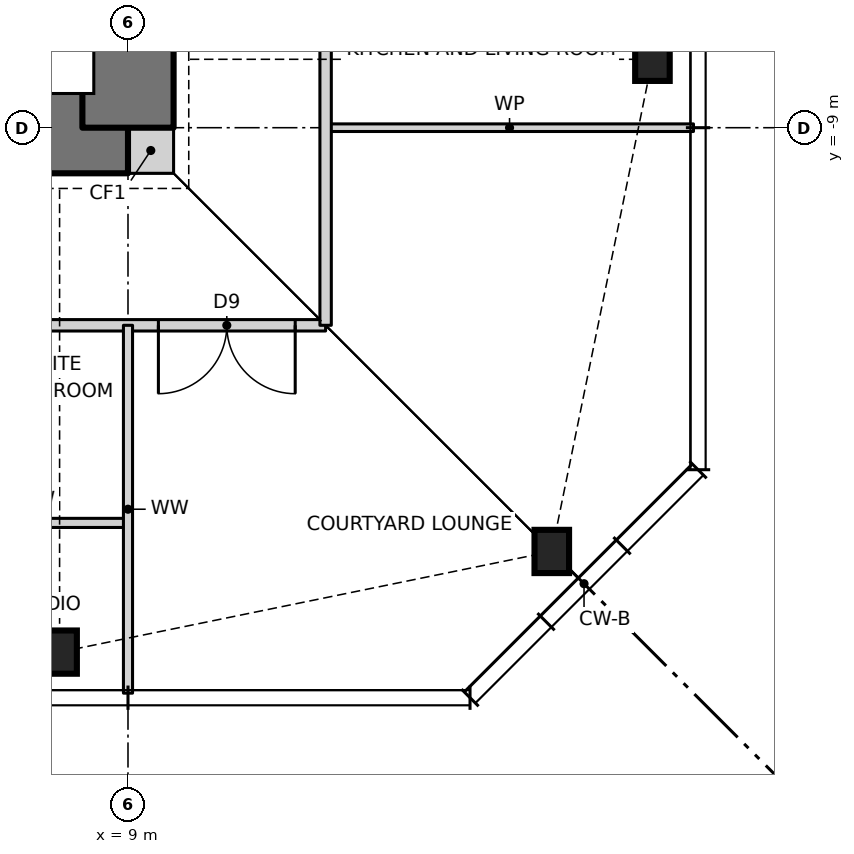
"""IFC4 building model, lengths in metres.
Left out: names, types, materials, properties, quantities, classifications, styles, units other than length and angle.
Written with IfcOpenShell. Run it as: python <this file> out.ifc"""

import sys

from ifc_helpers import new_model, si_unit, direction, frame, frame_2d, origin, origin_2d, place, context, subcontext, project, spatial, rectangle, i_section, extrude, element, fill, save


model = new_model("IFC4")
c1 = context("Model", 3, precision=1e-05, world=origin(), true_north=direction((0.0, 1.0)))
c2 = subcontext(c1, "Body", "Model", "MODEL_VIEW")
j1 = project(units=[si_unit("LENGTHUNIT", "METRE"), si_unit("PLANEANGLEUNIT", "RADIAN")], contexts=[c1])
p1 = place(None, origin())
s1 = spatial("IfcSite", under=j1, at=p1, CompositionType="ELEMENT")
p2 = place(p1, origin())
s2 = spatial("IfcBuilding", under=s1, at=p2, CompositionType="ELEMENT")
p3 = place(p2, frame((0.0, 0.0, 218.5)))
s3 = spatial("IfcBuildingStorey", under=s2, at=p3, CompositionType="ELEMENT", Elevation=218.5)
for number, where, z_axis, x_axis in (
    (1, (8.1, -15.9, 0.0), (0.0, 0.0, 1.0), (1.0, 0.0, 0.0)),
    (2, (14.576, -14.576, 0.0), (0.0, 0.0, 1.0), (1.0, 0.0, 0.0)),
    (3, (15.9, -8.1, 0.0), (0.0, 0.0, 1.0), (1.0, 0.0, 0.0)),
):
    element("IfcColumn", number, at=place(p3, frame(where, z_axis=z_axis, x_axis=x_axis)), inside=s3, PredefinedType="COLUMN", context=c2, shape_type="SweptSolid", body=[
        extrude(i_section(OverallWidth=0.455, OverallDepth=0.569, WebThickness=0.078, FlangeThickness=0.125, at=origin_2d()), origin(), (0.0, 0.0, 1.0), 3.5),
    ])
p4 = place(p3, frame((9.0, -9.3, 0.0), z_axis=(0.0, 0.0, 1.0), x_axis=(1.0, 0.0, 0.0)))
e4 = element("IfcWall", 4, at=p4, inside=s3, PredefinedType="SOLIDWALL", context=c2, shape_type="SweptSolid", body=[
    extrude(rectangle(XDim=0.6, YDim=0.6, at=frame_2d((0.3, 0.0))), origin(), (0.0, 0.0, 1.0), 3.5),
])
p5 = place(p3, frame((-9.0, -9.0, 0.0), z_axis=(0.0, 0.0, 1.0), x_axis=(1.0, 0.0, 0.0)))
e5 = element("IfcWall", 5, at=p5, inside=s3, PredefinedType="SHEAR", context=c2, shape_type="SweptSolid", body=[
    extrude(rectangle(XDim=18.0, YDim=1.2, at=frame_2d((9.0, 0.0))), origin(), (0.0, 0.0, 1.0), 3.5),
])
p6 = place(p5, frame((3.775, 0.0, 0.0)))
e6 = element("IfcOpeningElement", 6, at=p6, cuts=e5, PredefinedType="OPENING", context=c2, shape_type="SweptSolid", body=[
    extrude(rectangle(XDim=0.9, YDim=2.1, at=frame_2d((0.45, 1.05))), frame((0.0, 0.61, 0.0), z_axis=(0.0, -1.0, 0.0), x_axis=(1.0, 0.0, 0.0)), (0.0, 0.0, 1.0), 1.22),
])
p7 = place(p5, frame((10.625, 0.0, 0.0)))
e7 = element("IfcOpeningElement", 7, at=p7, cuts=e5, PredefinedType="OPENING", context=c2, shape_type="SweptSolid", body=[
    extrude(rectangle(XDim=0.9, YDim=2.1, at=frame_2d((0.45, 1.05))), frame((0.0, 0.61, 0.0), z_axis=(0.0, -1.0, 0.0), x_axis=(1.0, 0.0, 0.0)), (0.0, 0.0, 1.0), 1.22),
])
p8 = place(p3, frame((9.0, -9.0, 0.0), z_axis=(0.0, 0.0, 1.0), x_axis=(0.0, 1.0, 0.0)))
e8 = element("IfcWall", 8, at=p8, inside=s3, PredefinedType="SHEAR", context=c2, shape_type="SweptSolid", body=[
    extrude(rectangle(XDim=18.0, YDim=1.2, at=frame_2d((9.0, 0.0))), origin(), (0.0, 0.0, 1.0), 3.5),
])
p9 = place(p8, frame((8.5, 0.0, 0.0)))
e9 = element("IfcOpeningElement", 9, at=p9, cuts=e8, PredefinedType="OPENING", context=c2, shape_type="SweptSolid", body=[
    extrude(rectangle(XDim=1.0, YDim=2.1, at=frame_2d((0.5, 1.05))), frame((0.0, 0.61, 0.0), z_axis=(0.0, -1.0, 0.0), x_axis=(1.0, 0.0, 0.0)), (0.0, 0.0, 1.0), 1.22),
])
p10 = place(p3, frame((6.6, -14.2, 0.0), z_axis=(0.0, 0.0, 1.0), x_axis=(1.0, 0.0, 0.0)))
e10 = element("IfcWall", 10, at=p10, inside=s3, PredefinedType="PARTITIONING", context=c2, shape_type="SweptSolid", body=[
    extrude(rectangle(XDim=2.4, YDim=0.12, at=frame_2d((1.2, 0.0))), origin(), (0.0, 0.0, 1.0), 3.27),
])
p11 = place(p3, frame((-11.6, -11.6, 0.0), z_axis=(0.0, 0.0, 1.0), x_axis=(1.0, 0.0, 0.0)))
e11 = element("IfcWall", 11, at=p11, inside=s3, PredefinedType="PARTITIONING", context=c2, shape_type="SweptSolid", body=[
    extrude(rectangle(XDim=23.2, YDim=0.15, at=frame_2d((11.6, 0.0))), origin(), (0.0, 0.0, 1.0), 3.27),
])
p12 = place(p11, frame((5.55, 0.0, 0.0)))
e12 = element("IfcOpeningElement", 12, at=p12, cuts=e11, PredefinedType="OPENING", context=c2, shape_type="SweptSolid", body=[
    extrude(rectangle(XDim=1.0, YDim=2.1, at=frame_2d((0.5, 1.05))), frame((0.0, 0.085, 0.0), z_axis=(0.0, -1.0, 0.0), x_axis=(1.0, 0.0, 0.0)), (0.0, 0.0, 1.0), 0.17),
])
p13 = place(p11, frame((7.65, 0.0, 0.0)))
e13 = element("IfcOpeningElement", 13, at=p13, cuts=e11, PredefinedType="OPENING", context=c2, shape_type="SweptSolid", body=[
    extrude(rectangle(XDim=1.0, YDim=2.1, at=frame_2d((0.5, 1.05))), frame((0.0, 0.085, 0.0), z_axis=(0.0, -1.0, 0.0), x_axis=(1.0, 0.0, 0.0)), (0.0, 0.0, 1.0), 0.17),
])
p14 = place(p11, frame((14.55, 0.0, 0.0)))
e14 = element("IfcOpeningElement", 14, at=p14, cuts=e11, PredefinedType="OPENING", context=c2, shape_type="SweptSolid", body=[
    extrude(rectangle(XDim=1.0, YDim=2.1, at=frame_2d((0.5, 1.05))), frame((0.0, 0.085, 0.0), z_axis=(0.0, -1.0, 0.0), x_axis=(1.0, 0.0, 0.0)), (0.0, 0.0, 1.0), 0.17),
])
p15 = place(p11, frame((16.65, 0.0, 0.0)))
e15 = element("IfcOpeningElement", 15, at=p15, cuts=e11, PredefinedType="OPENING", context=c2, shape_type="SweptSolid", body=[
    extrude(rectangle(XDim=1.0, YDim=2.1, at=frame_2d((0.5, 1.05))), frame((0.0, 0.085, 0.0), z_axis=(0.0, -1.0, 0.0), x_axis=(1.0, 0.0, 0.0)), (0.0, 0.0, 1.0), 0.17),
])
p16 = place(p11, frame((21.0, 0.0, 0.0)))
e16 = element("IfcOpeningElement", 16, at=p16, cuts=e11, PredefinedType="OPENING", context=c2, shape_type="SweptSolid", body=[
    extrude(rectangle(XDim=1.8, YDim=2.1, at=frame_2d((0.9, 1.05))), frame((0.0, 0.085, 0.0), z_axis=(0.0, -1.0, 0.0), x_axis=(1.0, 0.0, 0.0)), (0.0, 0.0, 1.0), 0.17),
])
p17 = place(p3, frame((11.6, -9.0, 0.0), z_axis=(0.0, 0.0, 1.0), x_axis=(1.0, 0.0, 0.0)))
e17 = element("IfcWall", 17, at=p17, inside=s3, PredefinedType="PARTITIONING", context=c2, shape_type="SweptSolid", body=[
    extrude(rectangle(XDim=4.84, YDim=0.1, at=frame_2d((2.42, 0.0))), origin(), (0.0, 0.0, 1.0), 3.27),
])
p18 = place(p3, frame((11.6, -11.6, 0.0), z_axis=(0.0, 0.0, 1.0), x_axis=(0.0, 1.0, 0.0)))
e18 = element("IfcWall", 18, at=p18, inside=s3, PredefinedType="PARTITIONING", context=c2, shape_type="SweptSolid", body=[
    extrude(rectangle(XDim=23.2, YDim=0.15, at=frame_2d((11.6, 0.0))), origin(), (0.0, 0.0, 1.0), 3.27),
])
p19 = place(p18, frame((5.7, 0.0, 0.0)))
e19 = element("IfcOpeningElement", 19, at=p19, cuts=e18, PredefinedType="OPENING", context=c2, shape_type="SweptSolid", body=[
    extrude(rectangle(XDim=1.0, YDim=2.1, at=frame_2d((0.5, 1.05))), frame((0.0, 0.085, 0.0), z_axis=(0.0, -1.0, 0.0), x_axis=(1.0, 0.0, 0.0)), (0.0, 0.0, 1.0), 0.17),
])
p20 = place(p18, frame((12.15, 0.0, 0.0)))
e20 = element("IfcOpeningElement", 20, at=p20, cuts=e18, PredefinedType="OPENING", context=c2, shape_type="SweptSolid", body=[
    extrude(rectangle(XDim=1.0, YDim=2.1, at=frame_2d((0.5, 1.05))), frame((0.0, 0.085, 0.0), z_axis=(0.0, -1.0, 0.0), x_axis=(1.0, 0.0, 0.0)), (0.0, 0.0, 1.0), 0.17),
])
p21 = place(p18, frame((19.05, 0.0, 0.0)))
e21 = element("IfcOpeningElement", 21, at=p21, cuts=e18, PredefinedType="OPENING", context=c2, shape_type="SweptSolid", body=[
    extrude(rectangle(XDim=1.0, YDim=2.1, at=frame_2d((0.5, 1.05))), frame((0.0, 0.085, 0.0), z_axis=(0.0, -1.0, 0.0), x_axis=(1.0, 0.0, 0.0)), (0.0, 0.0, 1.0), 0.17),
])
p22 = place(p18, frame((21.0, 0.0, 0.0)))
e22 = element("IfcOpeningElement", 22, at=p22, cuts=e18, PredefinedType="OPENING", context=c2, shape_type="SweptSolid", body=[
    extrude(rectangle(XDim=1.8, YDim=2.1, at=frame_2d((0.9, 1.05))), frame((0.0, 0.085, 0.0), z_axis=(0.0, -1.0, 0.0), x_axis=(1.0, 0.0, 0.0)), (0.0, 0.0, 1.0), 0.17),
])
p23 = place(p3, frame((9.0, -16.44, 0.0), z_axis=(0.0, 0.0, 1.0), x_axis=(0.0, 1.0, 0.0)))
e23 = element("IfcWall", 23, at=p23, inside=s3, PredefinedType="PARTITIONING", context=c2, shape_type="SweptSolid", body=[
    extrude(rectangle(XDim=4.84, YDim=0.12, at=frame_2d((2.42, 0.0))), origin(), (0.0, 0.0, 1.0), 3.27),
])
p24 = place(p16, frame((1.8, 0.0, 0.0), z_axis=(0.0, 0.0, 1.0), x_axis=(-1.0, 0.0, 0.0)))
e24 = element("IfcDoor", 24, at=p24, inside=s3, OperationType="DOUBLE_DOOR_SINGLE_SWING", PredefinedType="DOOR", context=c2, shape_type="SweptSolid", body=[
    extrude(rectangle(XDim=1.8, YDim=2.1, at=frame_2d((0.9, 1.05))), frame((0.0, 0.025, 0.0), z_axis=(0.0, -1.0, 0.0), x_axis=(1.0, 0.0, 0.0)), (0.0, 0.0, 1.0), 0.05),
])
fill(e16, e24)
save(model, sys.argv[1])
